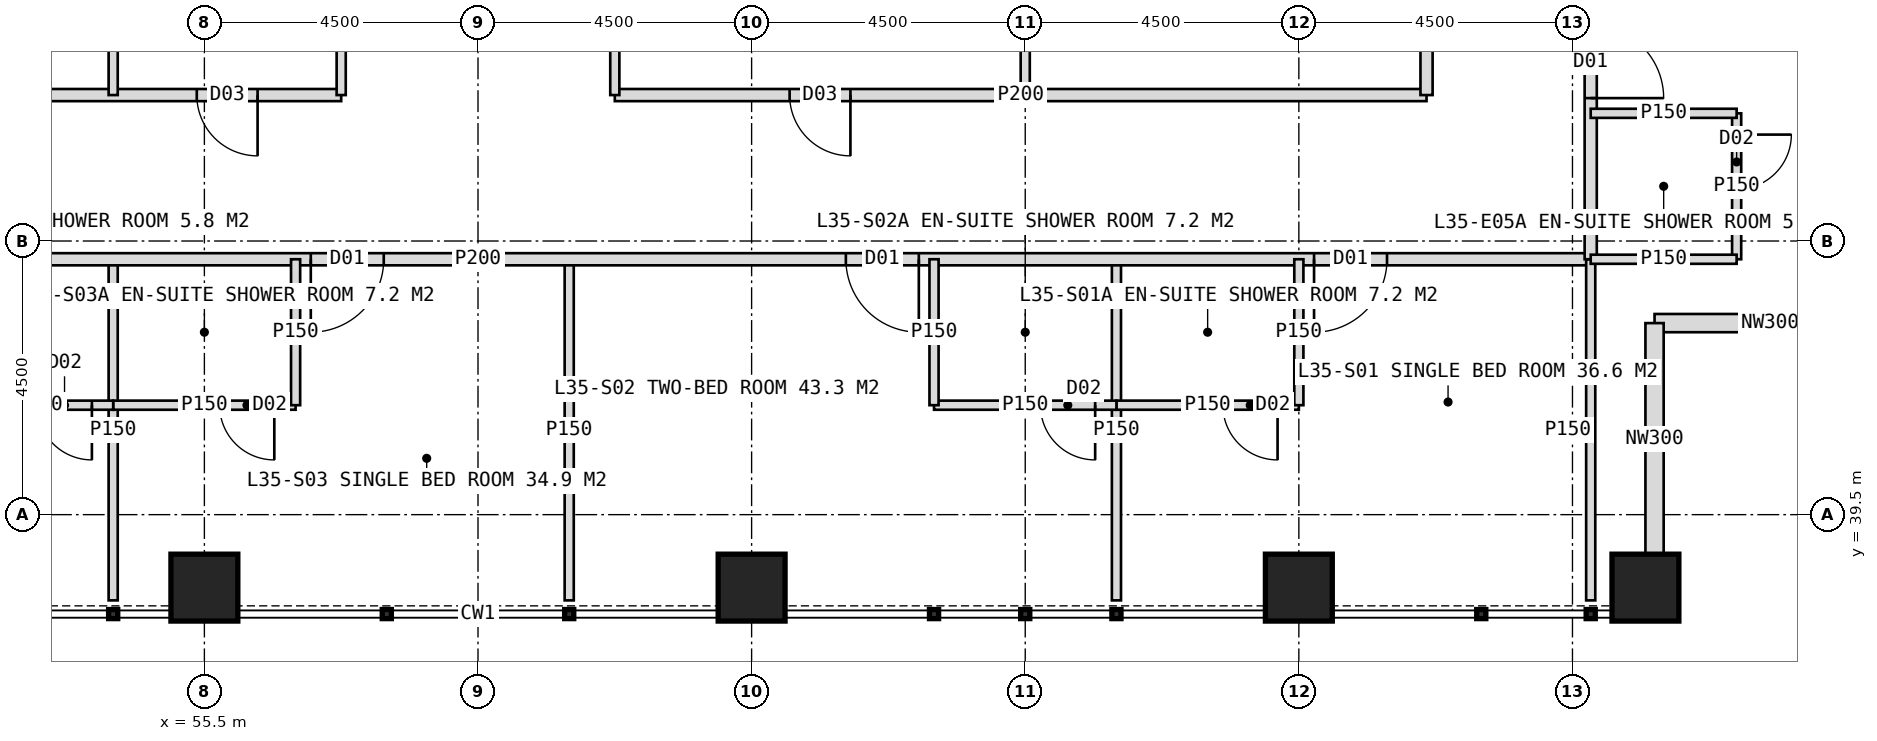
"""IFC4 building model, lengths in metres.
Left out: names, types, materials, properties, quantities, classifications, styles, units other than length and angle.
Written with IfcOpenShell. Run it as: python <this file> out.ifc"""

import sys

from ifc_helpers import new_model, si_unit, direction, frame, frame_2d, origin, origin_2d, place, context, subcontext, project, spatial, rectangle, hollow_rectangle, extrude, element, fill, save


model = new_model("IFC4")
c1 = context("Model", 3, precision=1e-05, world=origin(), true_north=direction((0.0, 1.0)))
c2 = subcontext(c1, "Body", "Model", "MODEL_VIEW")
j1 = project(units=[si_unit("LENGTHUNIT", "METRE"), si_unit("PLANEANGLEUNIT", "RADIAN")], contexts=[c1])
p1 = place(None, origin())
s1 = spatial("IfcSite", under=j1, at=p1, CompositionType="ELEMENT")
p2 = place(p1, origin())
s2 = spatial("IfcBuilding", under=s1, at=p2, CompositionType="ELEMENT")
p3 = place(p2, frame((0.0, 0.0, 148.0)))
s3 = spatial("IfcBuildingStorey", under=s2, at=p3, CompositionType="ELEMENT", Elevation=148.0)
for number, where, z_axis, x_axis in (
    (1, (55.5, 38.3, 0.0), (0.0, 0.0, 1.0), (1.0, 0.0, 0.0)),
    (2, (64.5, 38.3, 0.0), (0.0, 0.0, 1.0), (1.0, 0.0, 0.0)),
    (3, (73.5, 38.3, 0.0), (0.0, 0.0, 1.0), (1.0, 0.0, 0.0)),
    (4, (79.2, 38.3, 0.0), (0.0, 0.0, 1.0), (1.0, 0.0, 0.0)),
):
    element("IfcColumn", number, at=place(p3, frame(where, z_axis=z_axis, x_axis=x_axis)), inside=s3, PredefinedType="COLUMN", context=c2, shape_type="SweptSolid", body=[
        extrude(hollow_rectangle(XDim=1.1, YDim=1.1, WallThickness=0.1, at=origin_2d()), origin(), (0.0, 0.0, 1.0), 4.0),
    ])
for number, where, z_axis, x_axis in (
    (5, (83.15, 42.65, 0.0), (0.0, 0.0, 1.0), (-1.0, 0.0, 0.0)),
    (6, (79.35, 42.65, 0.0), (0.0, 0.0, 1.0), (0.0, -1.0, 0.0)),
):
    element("IfcWall", number, at=place(p3, frame(where, z_axis=z_axis, x_axis=x_axis)), inside=s3, PredefinedType="ELEMENTEDWALL", context=c2, shape_type="SweptSolid", body=[
        extrude(rectangle(XDim=3.8, YDim=0.3, at=frame_2d((1.9, 0.0))), origin(), (0.0, 0.0, 1.0), 4.0),
    ])
for number, where, z_axis, x_axis in (
    (7, (70.5, 43.7, 0.0), (0.0, 0.0, 1.0), (0.0, -1.0, 0.0)),
    (8, (61.5, 43.7, 0.0), (0.0, 0.0, 1.0), (0.0, -1.0, 0.0)),
    (9, (54.0, 43.7, 0.0), (0.0, 0.0, 1.0), (0.0, -1.0, 0.0)),
):
    element("IfcWall", number, at=place(p3, frame(where, z_axis=z_axis, x_axis=x_axis)), inside=s3, PredefinedType="PARTITIONING", context=c2, shape_type="SweptSolid", body=[
        extrude(rectangle(XDim=5.61, YDim=0.15, at=frame_2d((2.805, 0.0))), origin(), (0.0, 0.0, 1.0), 3.75),
    ])
p4 = place(p3, frame((78.3, 43.7, 0.0), z_axis=(0.0, 0.0, 1.0), x_axis=(-1.0, 0.0, 0.0)))
e10 = element("IfcWall", 10, at=p4, inside=s3, PredefinedType="PARTITIONING", context=c2, shape_type="SweptSolid", body=[
    extrude(rectangle(XDim=36.6, YDim=0.2, at=frame_2d((18.3, 0.0))), origin(), (0.0, 0.0, 1.0), 3.75),
])
p5 = place(p4, frame((3.35, 0.0, 0.0)))
e11 = element("IfcOpeningElement", 11, at=p5, cuts=e10, PredefinedType="OPENING", context=c2, shape_type="SweptSolid", body=[
    extrude(rectangle(XDim=1.2, YDim=2.2, at=frame_2d((0.6, 1.1))), frame((0.0, 0.11, 0.0), z_axis=(0.0, -1.0, 0.0), x_axis=(1.0, 0.0, 0.0)), (0.0, 0.0, 1.0), 0.22),
])
p6 = place(p4, frame((11.05, 0.0, 0.0)))
e12 = element("IfcOpeningElement", 12, at=p6, cuts=e10, PredefinedType="OPENING", context=c2, shape_type="SweptSolid", body=[
    extrude(rectangle(XDim=1.2, YDim=2.2, at=frame_2d((0.6, 1.1))), frame((0.0, 0.11, 0.0), z_axis=(0.0, -1.0, 0.0), x_axis=(1.0, 0.0, 0.0)), (0.0, 0.0, 1.0), 0.22),
])
p7 = place(p4, frame((19.85, 0.0, 0.0)))
e13 = element("IfcOpeningElement", 13, at=p7, cuts=e10, PredefinedType="OPENING", context=c2, shape_type="SweptSolid", body=[
    extrude(rectangle(XDim=1.2, YDim=2.2, at=frame_2d((0.6, 1.1))), frame((0.0, 0.11, 0.0), z_axis=(0.0, -1.0, 0.0), x_axis=(1.0, 0.0, 0.0)), (0.0, 0.0, 1.0), 0.22),
])
p8 = place(p4, frame((26.95, 0.0, 0.0)))
e14 = element("IfcOpeningElement", 14, at=p8, cuts=e10, PredefinedType="OPENING", context=c2, shape_type="SweptSolid", body=[
    extrude(rectangle(XDim=1.2, YDim=2.2, at=frame_2d((0.6, 1.1))), frame((0.0, 0.11, 0.0), z_axis=(0.0, -1.0, 0.0), x_axis=(1.0, 0.0, 0.0)), (0.0, 0.0, 1.0), 0.22),
])
p9 = place(p3, frame((78.3, 43.7, 0.0), z_axis=(0.0, 0.0, 1.0), x_axis=(0.0, -1.0, 0.0)))
e15 = element("IfcWall", 15, at=p9, inside=s3, PredefinedType="PARTITIONING", context=c2, shape_type="SweptSolid", body=[
    extrude(rectangle(XDim=5.61, YDim=0.15, at=frame_2d((2.805, 0.0))), origin(), (0.0, 0.0, 1.0), 3.75),
])
p10 = place(p3, frame((73.5, 41.3, 0.0), z_axis=(0.0, 0.0, 1.0), x_axis=(-1.0, 0.0, 0.0)))
e16 = element("IfcWall", 16, at=p10, inside=s3, PredefinedType="PARTITIONING", context=c2, shape_type="SweptSolid", body=[
    extrude(rectangle(XDim=3.0, YDim=0.15, at=frame_2d((1.5, 0.0))), origin(), (0.0, 0.0, 1.0), 3.75),
])
p11 = place(p10, frame((0.35, 0.0, 0.0)))
e17 = element("IfcOpeningElement", 17, at=p11, cuts=e16, PredefinedType="OPENING", context=c2, shape_type="SweptSolid", body=[
    extrude(rectangle(XDim=0.9, YDim=2.1, at=frame_2d((0.45, 1.05))), frame((0.0, 0.085, 0.0), z_axis=(0.0, -1.0, 0.0), x_axis=(1.0, 0.0, 0.0)), (0.0, 0.0, 1.0), 0.17),
])
p12 = place(p3, frame((73.5, 43.7, 0.0), z_axis=(0.0, 0.0, 1.0), x_axis=(0.0, -1.0, 0.0)))
e18 = element("IfcWall", 18, at=p12, inside=s3, PredefinedType="PARTITIONING", context=c2, shape_type="SweptSolid", body=[
    extrude(rectangle(XDim=2.4, YDim=0.15, at=frame_2d((1.2, 0.0))), origin(), (0.0, 0.0, 1.0), 2.95),
])
p13 = place(p3, frame((70.5, 41.3, 0.0), z_axis=(0.0, 0.0, 1.0), x_axis=(-1.0, 0.0, 0.0)))
e19 = element("IfcWall", 19, at=p13, inside=s3, PredefinedType="PARTITIONING", context=c2, shape_type="SweptSolid", body=[
    extrude(rectangle(XDim=3.0, YDim=0.15, at=frame_2d((1.5, 0.0))), origin(), (0.0, 0.0, 1.0), 3.75),
])
p14 = place(p13, frame((0.35, 0.0, 0.0)))
e20 = element("IfcOpeningElement", 20, at=p14, cuts=e19, PredefinedType="OPENING", context=c2, shape_type="SweptSolid", body=[
    extrude(rectangle(XDim=0.9, YDim=2.1, at=frame_2d((0.45, 1.05))), frame((0.0, 0.085, 0.0), z_axis=(0.0, -1.0, 0.0), x_axis=(1.0, 0.0, 0.0)), (0.0, 0.0, 1.0), 0.17),
])
p15 = place(p3, frame((67.5, 43.7, 0.0), z_axis=(0.0, 0.0, 1.0), x_axis=(0.0, -1.0, 0.0)))
e21 = element("IfcWall", 21, at=p15, inside=s3, PredefinedType="PARTITIONING", context=c2, shape_type="SweptSolid", body=[
    extrude(rectangle(XDim=2.4, YDim=0.15, at=frame_2d((1.2, 0.0))), origin(), (0.0, 0.0, 1.0), 3.75),
])
p16 = place(p3, frame((57.0, 41.3, 0.0), z_axis=(0.0, 0.0, 1.0), x_axis=(-1.0, 0.0, 0.0)))
e22 = element("IfcWall", 22, at=p16, inside=s3, PredefinedType="PARTITIONING", context=c2, shape_type="SweptSolid", body=[
    extrude(rectangle(XDim=3.0, YDim=0.15, at=frame_2d((1.5, 0.0))), origin(), (0.0, 0.0, 1.0), 3.75),
])
p17 = place(p16, frame((0.35, 0.0, 0.0)))
e23 = element("IfcOpeningElement", 23, at=p17, cuts=e22, PredefinedType="OPENING", context=c2, shape_type="SweptSolid", body=[
    extrude(rectangle(XDim=0.9, YDim=2.1, at=frame_2d((0.45, 1.05))), frame((0.0, 0.085, 0.0), z_axis=(0.0, -1.0, 0.0), x_axis=(1.0, 0.0, 0.0)), (0.0, 0.0, 1.0), 0.17),
])
p18 = place(p3, frame((57.0, 43.7, 0.0), z_axis=(0.0, 0.0, 1.0), x_axis=(0.0, -1.0, 0.0)))
e24 = element("IfcWall", 24, at=p18, inside=s3, PredefinedType="PARTITIONING", context=c2, shape_type="SweptSolid", body=[
    extrude(rectangle(XDim=2.4, YDim=0.15, at=frame_2d((1.2, 0.0))), origin(), (0.0, 0.0, 1.0), 3.75),
])
p19 = place(p3, frame((54.0, 41.3, 0.0), z_axis=(0.0, 0.0, 1.0), x_axis=(-1.0, 0.0, 0.0)))
e25 = element("IfcWall", 25, at=p19, inside=s3, PredefinedType="PARTITIONING", context=c2, shape_type="SweptSolid", body=[
    extrude(rectangle(XDim=2.4, YDim=0.15, at=frame_2d((1.2, 0.0))), origin(), (0.0, 0.0, 1.0), 3.75),
])
p20 = place(p19, frame((0.35, 0.0, 0.0)))
e26 = element("IfcOpeningElement", 26, at=p20, cuts=e25, PredefinedType="OPENING", context=c2, shape_type="SweptSolid", body=[
    extrude(rectangle(XDim=0.9, YDim=2.1, at=frame_2d((0.45, 1.05))), frame((0.0, 0.085, 0.0), z_axis=(0.0, -1.0, 0.0), x_axis=(1.0, 0.0, 0.0)), (0.0, 0.0, 1.0), 0.17),
])
p21 = place(p3, frame((69.0, 53.0, 0.0), z_axis=(0.0, 0.0, 1.0), x_axis=(0.0, -1.0, 0.0)))
e27 = element("IfcWall", 27, at=p21, inside=s3, PredefinedType="PARTITIONING", context=c2, shape_type="SweptSolid", body=[
    extrude(rectangle(XDim=6.6, YDim=0.15, at=frame_2d((3.3, 0.0))), origin(), (0.0, 0.0, 1.0), 3.75),
])
p22 = place(p3, frame((75.6, 46.4, 0.0), z_axis=(0.0, 0.0, 1.0), x_axis=(-1.0, 0.0, 0.0)))
e28 = element("IfcWall", 28, at=p22, inside=s3, PredefinedType="PARTITIONING", context=c2, shape_type="SweptSolid", body=[
    extrude(rectangle(XDim=13.35, YDim=0.2, at=frame_2d((6.675, 0.0))), origin(), (0.0, 0.0, 1.0), 3.75),
])
p23 = place(p22, frame((9.475, 0.0, 0.0)))
e29 = element("IfcOpeningElement", 29, at=p23, cuts=e28, PredefinedType="OPENING", context=c2, shape_type="SweptSolid", body=[
    extrude(rectangle(XDim=1.0, YDim=2.1, at=frame_2d((0.5, 1.05))), frame((0.0, 0.11, 0.0), z_axis=(0.0, -1.0, 0.0), x_axis=(1.0, 0.0, 0.0)), (0.0, 0.0, 1.0), 0.22),
])
p24 = place(p3, frame((57.75, 46.4, 0.0), z_axis=(0.0, 0.0, 1.0), x_axis=(-1.0, 0.0, 0.0)))
e30 = element("IfcWall", 30, at=p24, inside=s3, PredefinedType="PARTITIONING", context=c2, shape_type="SweptSolid", body=[
    extrude(rectangle(XDim=13.35, YDim=0.2, at=frame_2d((6.675, 0.0))), origin(), (0.0, 0.0, 1.0), 3.75),
])
p25 = place(p24, frame((1.375, 0.0, 0.0)))
e31 = element("IfcOpeningElement", 31, at=p25, cuts=e30, PredefinedType="OPENING", context=c2, shape_type="SweptSolid", body=[
    extrude(rectangle(XDim=1.0, YDim=2.1, at=frame_2d((0.5, 1.05))), frame((0.0, 0.11, 0.0), z_axis=(0.0, -1.0, 0.0), x_axis=(1.0, 0.0, 0.0)), (0.0, 0.0, 1.0), 0.22),
])
p26 = place(p24, frame((5.5, 0.0, 0.0)))
e32 = element("IfcOpeningElement", 32, at=p26, cuts=e30, PredefinedType="OPENING", context=c2, shape_type="SweptSolid", body=[
    extrude(rectangle(XDim=1.0, YDim=2.1, at=frame_2d((0.5, 1.05))), frame((0.0, 0.11, 0.0), z_axis=(0.0, -1.0, 0.0), x_axis=(1.0, 0.0, 0.0)), (0.0, 0.0, 1.0), 0.22),
])
p27 = place(p24, frame((10.3, 0.0, 0.0)))
e33 = element("IfcOpeningElement", 33, at=p27, cuts=e30, PredefinedType="OPENING", context=c2, shape_type="SweptSolid", body=[
    extrude(rectangle(XDim=1.0, YDim=2.1, at=frame_2d((0.5, 1.05))), frame((0.0, 0.11, 0.0), z_axis=(0.0, -1.0, 0.0), x_axis=(1.0, 0.0, 0.0)), (0.0, 0.0, 1.0), 0.22),
])
p28 = place(p3, frame((62.25, 53.0, 0.0), z_axis=(0.0, 0.0, 1.0), x_axis=(0.0, -1.0, 0.0)))
e34 = element("IfcWall", 34, at=p28, inside=s3, PredefinedType="PARTITIONING", context=c2, shape_type="SweptSolid", body=[
    extrude(rectangle(XDim=6.6, YDim=0.15, at=frame_2d((3.3, 0.0))), origin(), (0.0, 0.0, 1.0), 3.75),
])
p29 = place(p28, frame((0.6, 0.0, 0.0)))
e35 = element("IfcOpeningElement", 35, at=p29, cuts=e34, PredefinedType="OPENING", context=c2, shape_type="SweptSolid", body=[
    extrude(rectangle(XDim=0.9, YDim=2.1, at=frame_2d((0.45, 1.05))), frame((0.0, 0.085, 0.0), z_axis=(0.0, -1.0, 0.0), x_axis=(1.0, 0.0, 0.0)), (0.0, 0.0, 1.0), 0.17),
])
for number, where, z_axis, x_axis in (
    (36, (57.75, 53.0, 0.0), (0.0, 0.0, 1.0), (0.0, -1.0, 0.0)),
    (37, (54.0, 53.0, 0.0), (0.0, 0.0, 1.0), (0.0, -1.0, 0.0)),
):
    element("IfcWall", number, at=place(p3, frame(where, z_axis=z_axis, x_axis=x_axis)), inside=s3, PredefinedType="PARTITIONING", context=c2, shape_type="SweptSolid", body=[
        extrude(rectangle(XDim=6.6, YDim=0.15, at=frame_2d((3.3, 0.0))), origin(), (0.0, 0.0, 1.0), 3.75),
    ])
p30 = place(p3, frame((78.3, 80.3, 0.0), z_axis=(0.0, 0.0, 1.0), x_axis=(0.0, -1.0, 0.0)))
e38 = element("IfcWall", 38, at=p30, inside=s3, PredefinedType="PARTITIONING", context=c2, shape_type="SweptSolid", body=[
    extrude(rectangle(XDim=36.6, YDim=0.2, at=frame_2d((18.3, 0.0))), origin(), (0.0, 0.0, 1.0), 3.75),
])
p31 = place(p30, frame((3.35, 0.0, 0.0)))
e39 = element("IfcOpeningElement", 39, at=p31, cuts=e38, PredefinedType="OPENING", context=c2, shape_type="SweptSolid", body=[
    extrude(rectangle(XDim=1.2, YDim=2.2, at=frame_2d((0.6, 1.1))), frame((0.0, 0.11, 0.0), z_axis=(0.0, -1.0, 0.0), x_axis=(1.0, 0.0, 0.0)), (0.0, 0.0, 1.0), 0.22),
])
p32 = place(p30, frame((11.05, 0.0, 0.0)))
e40 = element("IfcOpeningElement", 40, at=p32, cuts=e38, PredefinedType="OPENING", context=c2, shape_type="SweptSolid", body=[
    extrude(rectangle(XDim=1.2, YDim=2.2, at=frame_2d((0.6, 1.1))), frame((0.0, 0.11, 0.0), z_axis=(0.0, -1.0, 0.0), x_axis=(1.0, 0.0, 0.0)), (0.0, 0.0, 1.0), 0.22),
])
p33 = place(p30, frame((16.3, 0.0, 0.0)))
e41 = element("IfcOpeningElement", 41, at=p33, cuts=e38, PredefinedType="OPENING", context=c2, shape_type="SweptSolid", body=[
    extrude(rectangle(XDim=1.0, YDim=2.1, at=frame_2d((0.5, 1.05))), frame((0.0, 0.11, 0.0), z_axis=(0.0, -1.0, 0.0), x_axis=(1.0, 0.0, 0.0)), (0.0, 0.0, 1.0), 0.22),
])
p34 = place(p30, frame((21.55, 0.0, 0.0)))
e42 = element("IfcOpeningElement", 42, at=p34, cuts=e38, PredefinedType="OPENING", context=c2, shape_type="SweptSolid", body=[
    extrude(rectangle(XDim=1.2, YDim=2.2, at=frame_2d((0.6, 1.1))), frame((0.0, 0.11, 0.0), z_axis=(0.0, -1.0, 0.0), x_axis=(1.0, 0.0, 0.0)), (0.0, 0.0, 1.0), 0.22),
])
p35 = place(p30, frame((32.75, 0.0, 0.0)))
e43 = element("IfcOpeningElement", 43, at=p35, cuts=e38, PredefinedType="OPENING", context=c2, shape_type="SweptSolid", body=[
    extrude(rectangle(XDim=1.2, YDim=2.2, at=frame_2d((0.6, 1.1))), frame((0.0, 0.11, 0.0), z_axis=(0.0, -1.0, 0.0), x_axis=(1.0, 0.0, 0.0)), (0.0, 0.0, 1.0), 0.22),
])
p36 = place(p3, frame((80.7, 46.1, 0.0), z_axis=(0.0, 0.0, 1.0), x_axis=(0.0, -1.0, 0.0)))
e44 = element("IfcWall", 44, at=p36, inside=s3, PredefinedType="PARTITIONING", context=c2, shape_type="SweptSolid", body=[
    extrude(rectangle(XDim=2.4, YDim=0.15, at=frame_2d((1.2, 0.0))), origin(), (0.0, 0.0, 1.0), 3.75),
])
p37 = place(p36, frame((0.35, 0.0, 0.0)))
e45 = element("IfcOpeningElement", 45, at=p37, cuts=e44, PredefinedType="OPENING", context=c2, shape_type="SweptSolid", body=[
    extrude(rectangle(XDim=0.9, YDim=2.1, at=frame_2d((0.45, 1.05))), frame((0.0, 0.085, 0.0), z_axis=(0.0, -1.0, 0.0), x_axis=(1.0, 0.0, 0.0)), (0.0, 0.0, 1.0), 0.17),
])
for number, where, z_axis, x_axis in (
    (46, (78.3, 46.1, 0.0), (0.0, 0.0, 1.0), (1.0, 0.0, 0.0)),
    (47, (78.3, 43.7, 0.0), (0.0, 0.0, 1.0), (1.0, 0.0, 0.0)),
):
    element("IfcWall", number, at=place(p3, frame(where, z_axis=z_axis, x_axis=x_axis)), inside=s3, PredefinedType="PARTITIONING", context=c2, shape_type="SweptSolid", body=[
        extrude(rectangle(XDim=2.4, YDim=0.15, at=frame_2d((1.2, 0.0))), origin(), (0.0, 0.0, 1.0), 3.75),
    ])
p38 = place(p3, frame((75.6, 62.0, 0.0), z_axis=(0.0, 0.0, 1.0), x_axis=(0.0, -1.0, 0.0)))
e48 = element("IfcWall", 48, at=p38, inside=s3, PredefinedType="PARTITIONING", context=c2, shape_type="SweptSolid", body=[
    extrude(rectangle(XDim=15.6, YDim=0.2, at=frame_2d((7.8, 0.0))), origin(), (0.0, 0.0, 1.0), 3.75),
])
p39 = place(p38, frame((2.5, 0.0, 0.0)))
e49 = element("IfcOpeningElement", 49, at=p39, cuts=e48, PredefinedType="OPENING", context=c2, shape_type="SweptSolid", body=[
    extrude(rectangle(XDim=1.0, YDim=2.1, at=frame_2d((0.5, 1.05))), frame((0.0, 0.11, 0.0), z_axis=(0.0, -1.0, 0.0), x_axis=(1.0, 0.0, 0.0)), (0.0, 0.0, 1.0), 0.22),
])
p40 = place(p38, frame((7.0, 0.0, 0.0)))
e50 = element("IfcOpeningElement", 50, at=p40, cuts=e48, PredefinedType="OPENING", context=c2, shape_type="SweptSolid", body=[
    extrude(rectangle(XDim=1.0, YDim=2.1, at=frame_2d((0.5, 1.05))), frame((0.0, 0.11, 0.0), z_axis=(0.0, -1.0, 0.0), x_axis=(1.0, 0.0, 0.0)), (0.0, 0.0, 1.0), 0.22),
])
p41 = place(p38, frame((11.8, 0.0, 0.0)))
e51 = element("IfcOpeningElement", 51, at=p41, cuts=e48, PredefinedType="OPENING", context=c2, shape_type="SweptSolid", body=[
    extrude(rectangle(XDim=1.0, YDim=2.1, at=frame_2d((0.5, 1.05))), frame((0.0, 0.11, 0.0), z_axis=(0.0, -1.0, 0.0), x_axis=(1.0, 0.0, 0.0)), (0.0, 0.0, 1.0), 0.22),
])
p42 = place(p5, origin())
e52 = element("IfcDoor", 52, at=p42, inside=s3, OperationType="SINGLE_SWING_RIGHT", PredefinedType="DOOR", context=c2, shape_type="SweptSolid", body=[
    extrude(rectangle(XDim=1.2, YDim=2.2, at=frame_2d((0.6, 1.1))), frame((0.0, 0.025, 0.0), z_axis=(0.0, -1.0, 0.0), x_axis=(1.0, 0.0, 0.0)), (0.0, 0.0, 1.0), 0.05),
])
fill(e11, e52)
p43 = place(p11, origin())
e53 = element("IfcDoor", 53, at=p43, inside=s3, OperationType="SINGLE_SWING_LEFT", PredefinedType="DOOR", context=c2, shape_type="SweptSolid", body=[
    extrude(rectangle(XDim=0.9, YDim=2.1, at=frame_2d((0.45, 1.05))), frame((0.0, 0.025, 0.0), z_axis=(0.0, -1.0, 0.0), x_axis=(1.0, 0.0, 0.0)), (0.0, 0.0, 1.0), 0.05),
])
fill(e17, e53)
p44 = place(p6, origin())
e54 = element("IfcDoor", 54, at=p44, inside=s3, OperationType="SINGLE_SWING_LEFT", PredefinedType="DOOR", context=c2, shape_type="SweptSolid", body=[
    extrude(rectangle(XDim=1.2, YDim=2.2, at=frame_2d((0.6, 1.1))), frame((0.0, 0.025, 0.0), z_axis=(0.0, -1.0, 0.0), x_axis=(1.0, 0.0, 0.0)), (0.0, 0.0, 1.0), 0.05),
])
fill(e12, e54)
p45 = place(p14, origin())
e55 = element("IfcDoor", 55, at=p45, inside=s3, OperationType="SINGLE_SWING_LEFT", PredefinedType="DOOR", context=c2, shape_type="SweptSolid", body=[
    extrude(rectangle(XDim=0.9, YDim=2.1, at=frame_2d((0.45, 1.05))), frame((0.0, 0.025, 0.0), z_axis=(0.0, -1.0, 0.0), x_axis=(1.0, 0.0, 0.0)), (0.0, 0.0, 1.0), 0.05),
])
fill(e20, e55)
p46 = place(p7, origin())
e56 = element("IfcDoor", 56, at=p46, inside=s3, OperationType="SINGLE_SWING_RIGHT", PredefinedType="DOOR", context=c2, shape_type="SweptSolid", body=[
    extrude(rectangle(XDim=1.2, YDim=2.2, at=frame_2d((0.6, 1.1))), frame((0.0, 0.025, 0.0), z_axis=(0.0, -1.0, 0.0), x_axis=(1.0, 0.0, 0.0)), (0.0, 0.0, 1.0), 0.05),
])
fill(e13, e56)
p47 = place(p17, origin())
e57 = element("IfcDoor", 57, at=p47, inside=s3, OperationType="SINGLE_SWING_LEFT", PredefinedType="DOOR", context=c2, shape_type="SweptSolid", body=[
    extrude(rectangle(XDim=0.9, YDim=2.1, at=frame_2d((0.45, 1.05))), frame((0.0, 0.025, 0.0), z_axis=(0.0, -1.0, 0.0), x_axis=(1.0, 0.0, 0.0)), (0.0, 0.0, 1.0), 0.05),
])
fill(e23, e57)
p48 = place(p20, origin())
e58 = element("IfcDoor", 58, at=p48, inside=s3, OperationType="SINGLE_SWING_LEFT", PredefinedType="DOOR", context=c2, shape_type="SweptSolid", body=[
    extrude(rectangle(XDim=0.9, YDim=2.1, at=frame_2d((0.45, 1.05))), frame((0.0, 0.025, 0.0), z_axis=(0.0, -1.0, 0.0), x_axis=(1.0, 0.0, 0.0)), (0.0, 0.0, 1.0), 0.05),
])
fill(e26, e58)
p49 = place(p23, origin())
e59 = element("IfcDoor", 59, at=p49, inside=s3, OperationType="SINGLE_SWING_LEFT", PredefinedType="DOOR", context=c2, shape_type="SweptSolid", body=[
    extrude(rectangle(XDim=1.0, YDim=2.1, at=frame_2d((0.5, 1.05))), frame((0.0, 0.025, 0.0), z_axis=(0.0, -1.0, 0.0), x_axis=(1.0, 0.0, 0.0)), (0.0, 0.0, 1.0), 0.05),
])
fill(e29, e59)
p50 = place(p25, origin())
e60 = element("IfcDoor", 60, at=p50, inside=s3, OperationType="SINGLE_SWING_LEFT", PredefinedType="DOOR", context=c2, shape_type="SweptSolid", body=[
    extrude(rectangle(XDim=1.0, YDim=2.1, at=frame_2d((0.5, 1.05))), frame((0.0, 0.025, 0.0), z_axis=(0.0, -1.0, 0.0), x_axis=(1.0, 0.0, 0.0)), (0.0, 0.0, 1.0), 0.05),
])
fill(e31, e60)
p51 = place(p35, origin())
e61 = element("IfcDoor", 61, at=p51, inside=s3, OperationType="SINGLE_SWING_RIGHT", PredefinedType="DOOR", context=c2, shape_type="SweptSolid", body=[
    extrude(rectangle(XDim=1.2, YDim=2.2, at=frame_2d((0.6, 1.1))), frame((0.0, 0.025, 0.0), z_axis=(0.0, -1.0, 0.0), x_axis=(1.0, 0.0, 0.0)), (0.0, 0.0, 1.0), 0.05),
])
fill(e43, e61)
p52 = place(p37, origin())
e62 = element("IfcDoor", 62, at=p52, inside=s3, OperationType="SINGLE_SWING_LEFT", PredefinedType="DOOR", context=c2, shape_type="SweptSolid", body=[
    extrude(rectangle(XDim=0.9, YDim=2.1, at=frame_2d((0.45, 1.05))), frame((0.0, 0.025, 0.0), z_axis=(0.0, -1.0, 0.0), x_axis=(1.0, 0.0, 0.0)), (0.0, 0.0, 1.0), 0.05),
])
fill(e45, e62)
save(model, sys.argv[1])
